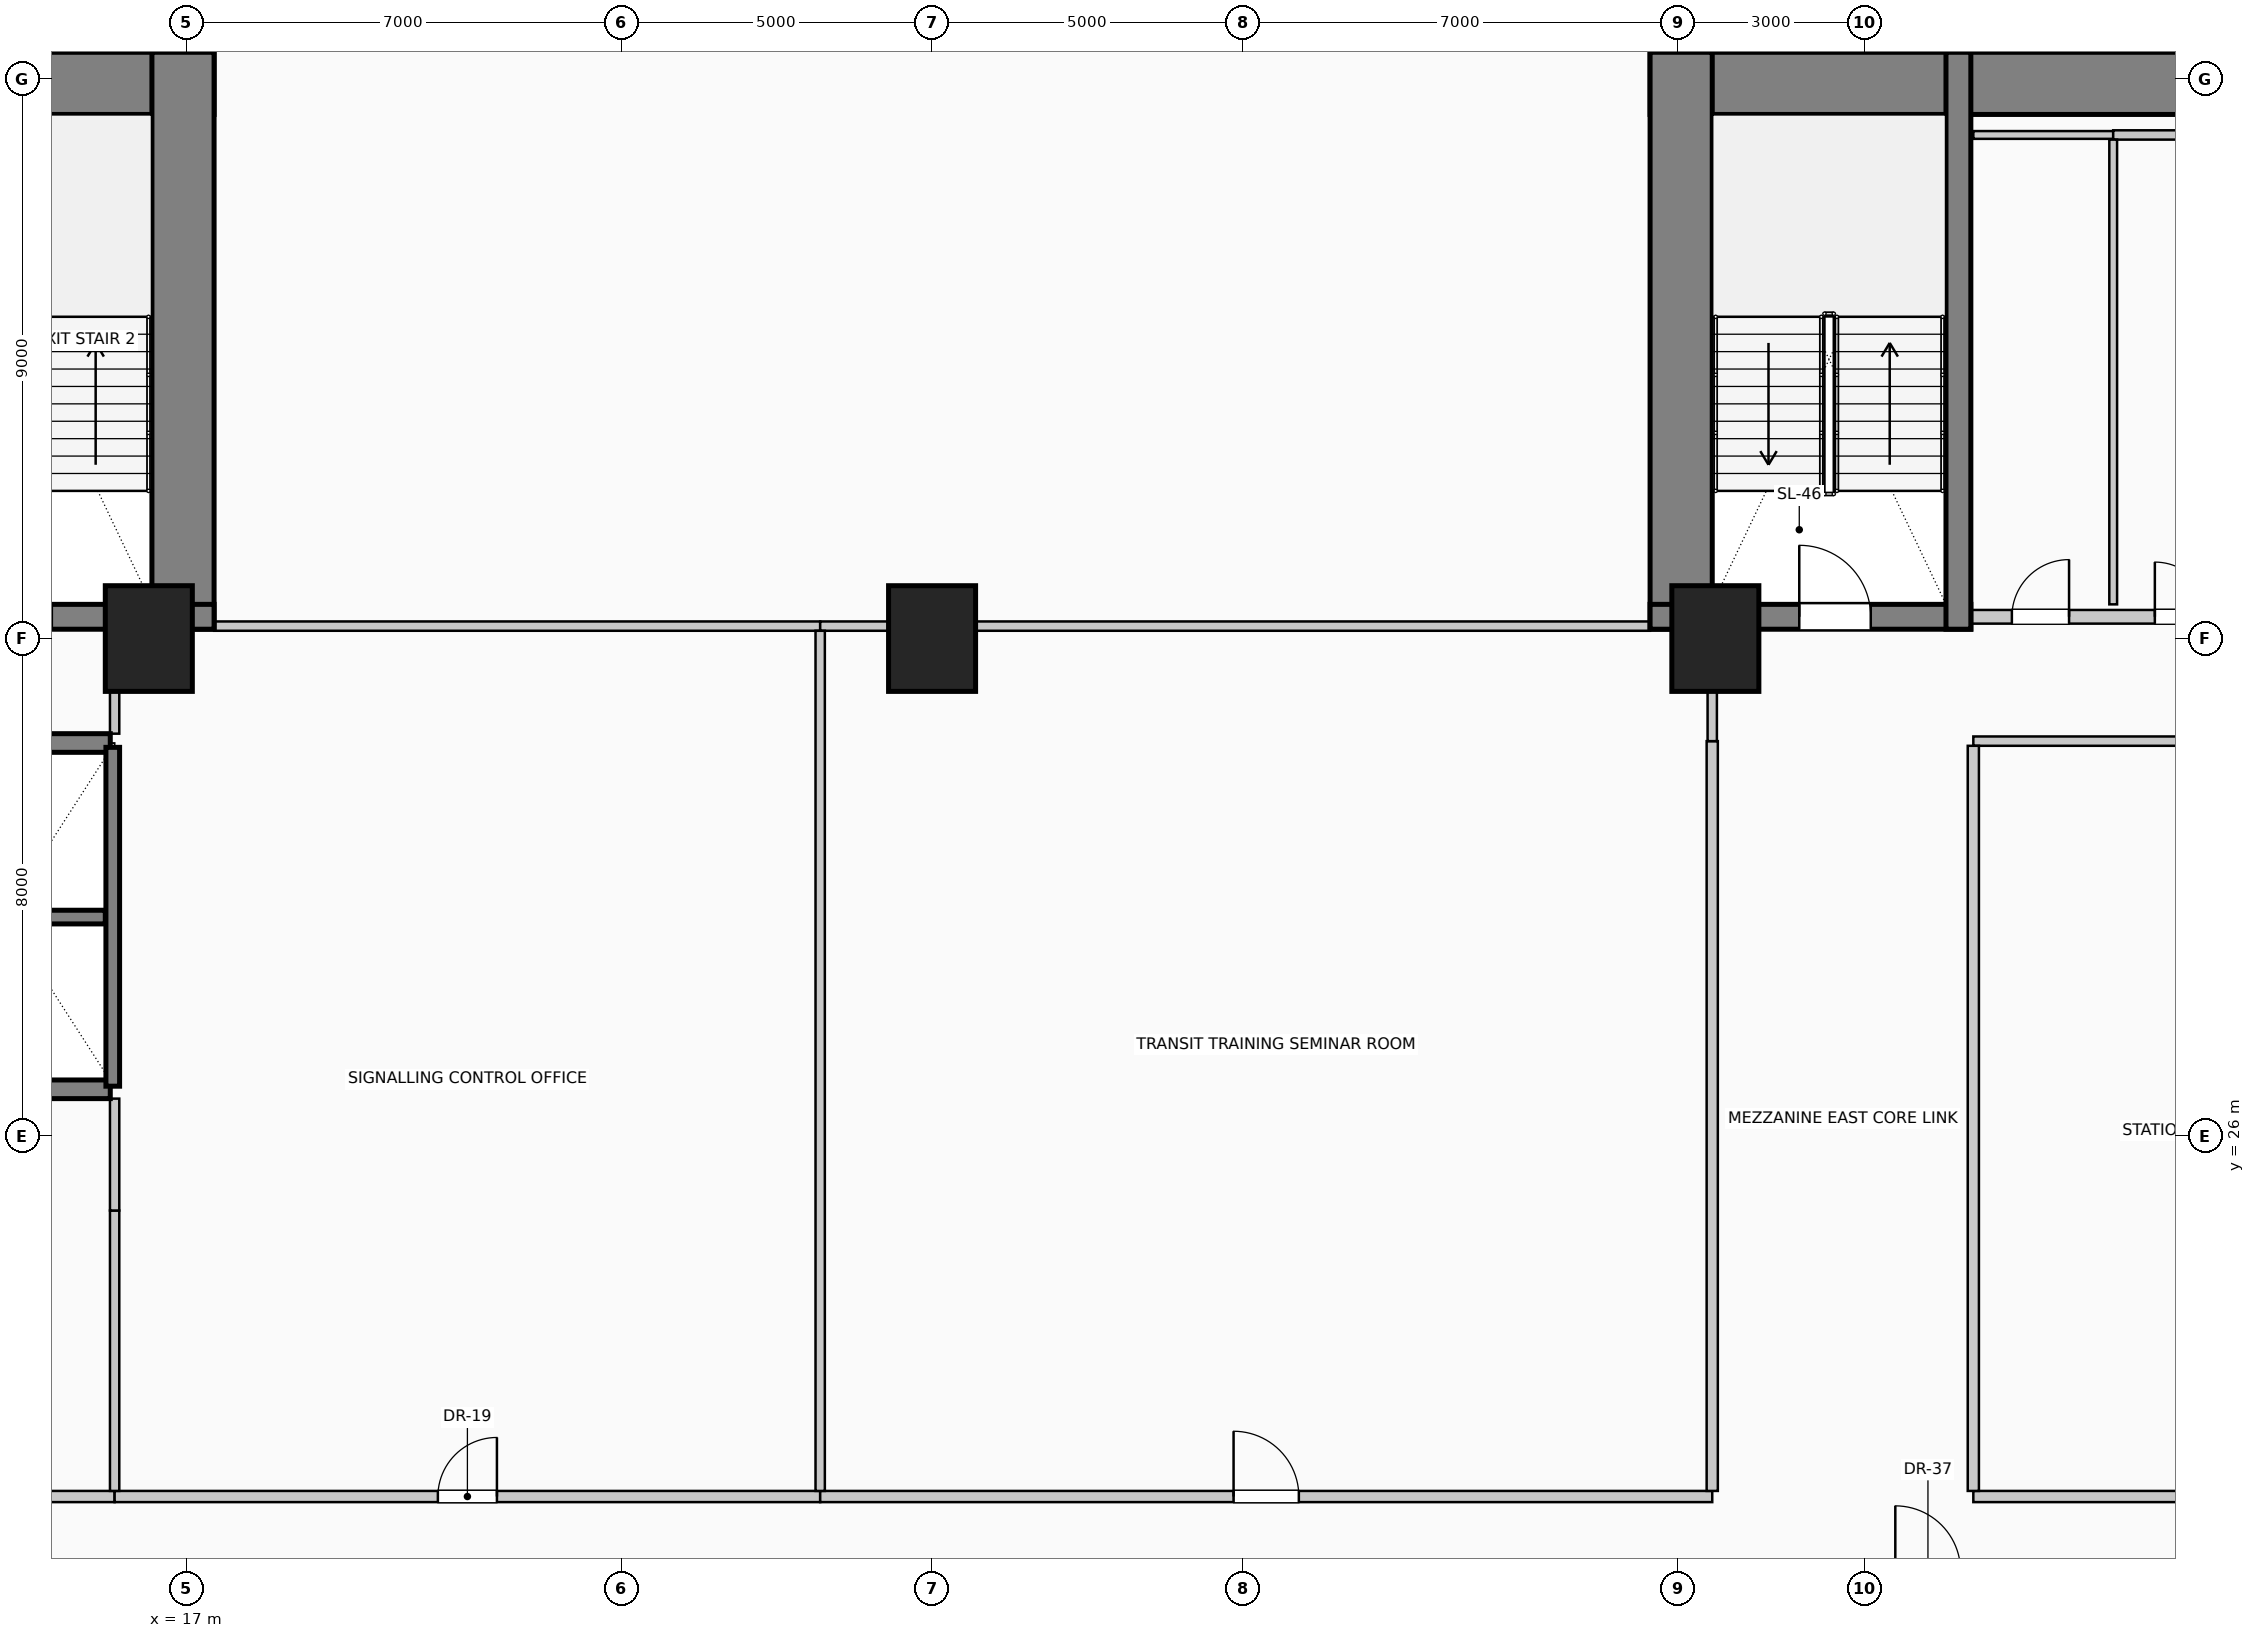
"""IFC4 building model, lengths in metres.
Left out: names, types, materials, properties, quantities, classifications, styles, units other than length and angle.
Written with IfcOpenShell. Run it as: python <this file> out.ifc"""

import sys

from ifc_helpers import new_model, si_unit, direction, frame, frame_2d, origin, origin_2d, place, context, subcontext, project, spatial, rectangle, extrude, element, fill, save


model = new_model("IFC4")
c1 = context("Model", 3, precision=1e-05, world=origin(), true_north=direction((0.0, 1.0)))
c2 = subcontext(c1, "Body", "Model", "MODEL_VIEW")
j1 = project(units=[si_unit("LENGTHUNIT", "METRE"), si_unit("PLANEANGLEUNIT", "RADIAN")], contexts=[c1])
p1 = place(None, origin())
s1 = spatial("IfcSite", under=j1, at=p1, CompositionType="ELEMENT")
p2 = place(p1, origin())
s2 = spatial("IfcBuilding", under=s1, at=p2, CompositionType="ELEMENT")
p3 = place(p2, frame((0.0, 0.0, 13.5)))
s3 = spatial("IfcBuildingStorey", under=s2, at=p3, CompositionType="ELEMENT", Elevation=13.5)
p4 = place(p3, frame((2.55, 42.93, 0.0), z_axis=(0.0, 0.0, 1.0), x_axis=(1.0, 0.0, 0.0)))
e1 = element("IfcWall", 1, at=p4, inside=s3, PredefinedType="SHEAR", context=c2, shape_type="SweptSolid", body=[
    extrude(rectangle(XDim=14.9, YDim=1.0, at=frame_2d((7.45, 0.0))), origin(), (0.0, 0.0, 1.0), 4.05),
])
p5 = place(p3, frame((16.95, 34.15, 0.0), z_axis=(0.0, 0.0, 1.0), x_axis=(0.0, 1.0, 0.0)))
e2 = element("IfcWall", 2, at=p5, inside=s3, PredefinedType="SHEAR", context=c2, shape_type="SweptSolid", body=[
    extrude(rectangle(XDim=9.28, YDim=1.0, at=frame_2d((4.64, 0.0))), origin(), (0.0, 0.0, 1.0), 4.05),
])
p6 = place(p3, frame((12.29, 34.35, 0.0), z_axis=(0.0, 0.0, 1.0), x_axis=(1.0, 0.0, 0.0)))
e3 = element("IfcWall", 3, at=p6, inside=s3, PredefinedType="SHEAR", context=c2, shape_type="SweptSolid", body=[
    extrude(rectangle(XDim=5.16, YDim=0.4, at=frame_2d((2.58, 0.0))), origin(), (0.0, 0.0, 1.0), 4.05),
])
p7 = place(p6, frame((1.4, 0.0, 0.0)))
e4 = element("IfcOpeningElement", 4, at=p7, cuts=e3, PredefinedType="OPENING", context=c2, shape_type="SweptSolid", body=[
    extrude(rectangle(XDim=1.15, YDim=2.2, at=frame_2d((0.575, 1.1))), frame((0.0, 0.21, 0.0), z_axis=(0.0, -1.0, 0.0), x_axis=(1.0, 0.0, 0.0)), (0.0, 0.0, 1.0), 0.42),
])
p8 = place(p3, frame((40.55, 42.93, 0.0), z_axis=(0.0, 0.0, 1.0), x_axis=(1.0, 0.0, 0.0)))
e5 = element("IfcWall", 5, at=p8, inside=s3, PredefinedType="SHEAR", context=c2, shape_type="SweptSolid", body=[
    extrude(rectangle(XDim=14.9, YDim=1.0, at=frame_2d((7.45, 0.0))), origin(), (0.0, 0.0, 1.0), 4.05),
])
p9 = place(p3, frame((41.05, 34.15, 0.0), z_axis=(0.0, 0.0, 1.0), x_axis=(0.0, 1.0, 0.0)))
e6 = element("IfcWall", 6, at=p9, inside=s3, PredefinedType="SHEAR", context=c2, shape_type="SweptSolid", body=[
    extrude(rectangle(XDim=9.28, YDim=1.0, at=frame_2d((4.64, 0.0))), origin(), (0.0, 0.0, 1.0), 4.05),
])
p10 = place(p3, frame((40.55, 34.35, 0.0), z_axis=(0.0, 0.0, 1.0), x_axis=(1.0, 0.0, 0.0)))
e7 = element("IfcWall", 7, at=p10, inside=s3, PredefinedType="SHEAR", context=c2, shape_type="SweptSolid", body=[
    extrude(rectangle(XDim=5.16, YDim=0.4, at=frame_2d((2.58, 0.0))), origin(), (0.0, 0.0, 1.0), 4.05),
])
p11 = place(p10, frame((2.4, 0.0, 0.0)))
e8 = element("IfcOpeningElement", 8, at=p11, cuts=e7, PredefinedType="OPENING", context=c2, shape_type="SweptSolid", body=[
    extrude(rectangle(XDim=1.15, YDim=2.2, at=frame_2d((0.575, 1.1))), frame((0.0, 0.21, 0.0), z_axis=(0.0, -1.0, 0.0), x_axis=(1.0, 0.0, 0.0)), (0.0, 0.0, 1.0), 0.42),
])
p12 = place(p3, frame((45.51, 34.15, 0.0), z_axis=(0.0, 0.0, 1.0), x_axis=(0.0, 1.0, 0.0)))
e9 = element("IfcWall", 9, at=p12, inside=s3, PredefinedType="SHEAR", context=c2, shape_type="SweptSolid", body=[
    extrude(rectangle(XDim=9.28, YDim=0.4, at=frame_2d((4.64, 0.0))), origin(), (0.0, 0.0, 1.0), 4.05),
])
for number, where, z_axis, x_axis in (
    (10, (16.4, 34.0, 0.0), (0.0, 0.0, 1.0), (1.0, 0.0, 0.0)),
    (11, (29.0, 34.0, 0.0), (0.0, 0.0, 1.0), (1.0, 0.0, 0.0)),
    (12, (41.6, 34.0, 0.0), (0.0, 0.0, 1.0), (1.0, 0.0, 0.0)),
):
    element("IfcColumn", number, at=place(p3, frame(where, z_axis=z_axis, x_axis=x_axis)), inside=s3, PredefinedType="COLUMN", context=c2, shape_type="SweptSolid", body=[
        extrude(rectangle(XDim=1.4, YDim=1.7, at=origin_2d()), origin(), (0.0, 0.0, 1.0), 4.05),
    ])
for number, where, z_axis, x_axis in (
    (13, (15.78, 26.75, 0.0), (0.0, 0.0, 1.0), (-1.0, 0.0, 0.0)),
    (14, (14.0, 32.32, 0.0), (0.0, 0.0, 1.0), (1.0, 0.0, 0.0)),
):
    element("IfcWall", number, at=place(p3, frame(where, z_axis=z_axis, x_axis=x_axis)), inside=s3, PredefinedType="SOLIDWALL", context=c2, shape_type="SweptSolid", body=[
        extrude(rectangle(XDim=1.78, YDim=0.3, at=frame_2d((0.89, 0.0))), origin(), (0.0, 0.0, 1.0), 4.05),
    ])
p13 = place(p3, frame((15.82, 26.8, 0.0), z_axis=(0.0, 0.0, 1.0), x_axis=(0.0, 1.0, 0.0)))
e15 = element("IfcWall", 15, at=p13, inside=s3, PredefinedType="SOLIDWALL", context=c2, shape_type="SweptSolid", body=[
    extrude(rectangle(XDim=5.45, YDim=0.22, at=frame_2d((2.725, 0.0))), origin(), (0.0, 0.0, 1.0), 4.05),
])
p14 = place(p3, frame((12.3, 29.52, 0.0), z_axis=(0.0, 0.0, 1.0), x_axis=(1.0, 0.0, 0.0)))
e16 = element("IfcWall", 16, at=p14, inside=s3, PredefinedType="SOLIDWALL", context=c2, shape_type="SweptSolid", body=[
    extrude(rectangle(XDim=3.4, YDim=0.22, at=frame_2d((1.7, 0.0))), origin(), (0.0, 0.0, 1.0), 4.05),
])
p15 = place(p3, frame((45.72, 34.35, 0.0), z_axis=(0.0, 0.0, 1.0), x_axis=(1.0, 0.0, 0.0)))
e17 = element("IfcWall", 17, at=p15, inside=s3, PredefinedType="PARTITIONING", context=c2, shape_type="SweptSolid", body=[
    extrude(rectangle(XDim=4.56, YDim=0.22, at=frame_2d((2.28, 0.0))), origin(), (0.0, 0.0, 1.0), 2.695),
])
p16 = place(p15, frame((0.65, 0.0, 0.0)))
e18 = element("IfcOpeningElement", 18, at=p16, cuts=e17, PredefinedType="OPENING", context=c2, shape_type="SweptSolid", body=[
    extrude(rectangle(XDim=0.92, YDim=2.1, at=frame_2d((0.46, 1.05))), frame((0.0, 0.12, 0.0), z_axis=(0.0, -1.0, 0.0), x_axis=(1.0, 0.0, 0.0)), (0.0, 0.0, 1.0), 0.24),
])
p17 = place(p15, frame((2.95, 0.0, 0.0)))
e19 = element("IfcOpeningElement", 19, at=p17, cuts=e17, PredefinedType="OPENING", context=c2, shape_type="SweptSolid", body=[
    extrude(rectangle(XDim=0.88, YDim=2.1, at=frame_2d((0.44, 1.05))), frame((0.0, 0.12, 0.0), z_axis=(0.0, -1.0, 0.0), x_axis=(1.0, 0.0, 0.0)), (0.0, 0.0, 1.0), 0.24),
])
p18 = place(p3, frame((12.2, 20.2, 0.0), z_axis=(0.0, 0.0, 1.0), x_axis=(1.0, 0.0, 0.0)))
e20 = element("IfcWall", 20, at=p18, inside=s3, PredefinedType="PARTITIONING", context=c2, shape_type="SweptSolid", body=[
    extrude(rectangle(XDim=3.65, YDim=0.18, at=frame_2d((1.825, 0.0))), origin(), (0.0, 0.0, 1.0), 3.65),
])
p19 = place(p3, frame((15.85, 20.2, 0.0), z_axis=(0.0, 0.0, 1.0), x_axis=(1.0, 0.0, 0.0)))
e21 = element("IfcWall", 21, at=p19, inside=s3, PredefinedType="PARTITIONING", context=c2, shape_type="SweptSolid", body=[
    extrude(rectangle(XDim=11.35, YDim=0.18, at=frame_2d((5.675, 0.0))), origin(), (0.0, 0.0, 1.0), 3.65),
])
p20 = place(p19, frame((5.2, 0.0, 0.0)))
e22 = element("IfcOpeningElement", 22, at=p20, cuts=e21, PredefinedType="OPENING", context=c2, shape_type="SweptSolid", body=[
    extrude(rectangle(XDim=0.95, YDim=2.15, at=frame_2d((0.475, 1.075))), frame((0.0, 0.1, 0.0), z_axis=(0.0, -1.0, 0.0), x_axis=(1.0, 0.0, 0.0)), (0.0, 0.0, 1.0), 0.2),
])
p21 = place(p3, frame((27.2, 20.2, 0.0), z_axis=(0.0, 0.0, 1.0), x_axis=(1.0, 0.0, 0.0)))
e23 = element("IfcWall", 23, at=p21, inside=s3, PredefinedType="PARTITIONING", context=c2, shape_type="SweptSolid", body=[
    extrude(rectangle(XDim=14.35, YDim=0.18, at=frame_2d((7.175, 0.0))), origin(), (0.0, 0.0, 1.0), 3.65),
])
p22 = place(p21, frame((6.65, 0.0, 0.0)))
e24 = element("IfcOpeningElement", 24, at=p22, cuts=e23, PredefinedType="OPENING", context=c2, shape_type="SweptSolid", body=[
    extrude(rectangle(XDim=1.05, YDim=2.15, at=frame_2d((0.525, 1.075))), frame((0.0, 0.1, 0.0), z_axis=(0.0, -1.0, 0.0), x_axis=(1.0, 0.0, 0.0)), (0.0, 0.0, 1.0), 0.2),
])
p23 = place(p3, frame((45.75, 20.2, 0.0), z_axis=(0.0, 0.0, 1.0), x_axis=(1.0, 0.0, 0.0)))
e25 = element("IfcWall", 25, at=p23, inside=s3, PredefinedType="PARTITIONING", context=c2, shape_type="SweptSolid", body=[
    extrude(rectangle(XDim=8.05, YDim=0.18, at=frame_2d((4.025, 0.0))), origin(), (0.0, 0.0, 1.0), 3.65),
])
p24 = place(p3, frame((45.75, 32.35, 0.0), z_axis=(0.0, 0.0, 1.0), x_axis=(1.0, 0.0, 0.0)))
e26 = element("IfcWall", 26, at=p24, inside=s3, PredefinedType="PARTITIONING", context=c2, shape_type="SweptSolid", body=[
    extrude(rectangle(XDim=8.7, YDim=0.15, at=frame_2d((4.35, 0.0))), origin(), (0.0, 0.0, 1.0), 3.65),
])
p25 = place(p24, frame((3.91, 0.0, 0.0)))
e27 = element("IfcOpeningElement", 27, at=p25, cuts=e26, PredefinedType="OPENING", context=c2, shape_type="SweptSolid", body=[
    extrude(rectangle(XDim=0.88, YDim=2.1, at=frame_2d((0.44, 1.05))), frame((0.0, 0.085, 0.0), z_axis=(0.0, -1.0, 0.0), x_axis=(1.0, 0.0, 0.0)), (0.0, 0.0, 1.0), 0.17),
])
p26 = place(p3, frame((17.45, 34.2, 0.0), z_axis=(0.0, 0.0, 1.0), x_axis=(1.0, 0.0, 0.0)))
e28 = element("IfcWall", 28, at=p26, inside=s3, PredefinedType="PARTITIONING", context=c2, shape_type="SweptSolid", body=[
    extrude(rectangle(XDim=9.75, YDim=0.15, at=frame_2d((4.875, 0.0))), origin(), (0.0, 0.0, 1.0), 2.695),
])
p27 = place(p3, frame((27.2, 34.2, 0.0), z_axis=(0.0, 0.0, 1.0), x_axis=(1.0, 0.0, 0.0)))
e29 = element("IfcWall", 29, at=p27, inside=s3, PredefinedType="PARTITIONING", context=c2, shape_type="SweptSolid", body=[
    extrude(rectangle(XDim=1.1, YDim=0.15, at=frame_2d((0.55, 0.0))), origin(), (0.0, 0.0, 1.0), 2.695),
])
p28 = place(p3, frame((29.7, 34.2, 0.0), z_axis=(0.0, 0.0, 1.0), x_axis=(1.0, 0.0, 0.0)))
e30 = element("IfcWall", 30, at=p28, inside=s3, PredefinedType="PARTITIONING", context=c2, shape_type="SweptSolid", body=[
    extrude(rectangle(XDim=10.85, YDim=0.15, at=frame_2d((5.425, 0.0))), origin(), (0.0, 0.0, 1.0), 2.695),
])
p29 = place(p3, frame((45.75, 42.1, 0.0), z_axis=(0.0, 0.0, 1.0), x_axis=(1.0, 0.0, 0.0)))
e31 = element("IfcWall", 31, at=p29, inside=s3, PredefinedType="PARTITIONING", context=c2, shape_type="SweptSolid", body=[
    extrude(rectangle(XDim=2.25, YDim=0.125, at=frame_2d((1.125, 0.0))), origin(), (0.0, 0.0, 1.0), 3.65),
])
p30 = place(p3, frame((48.0, 42.1, 0.0), z_axis=(0.0, 0.0, 1.0), x_axis=(1.0, 0.0, 0.0)))
e32 = element("IfcWall", 32, at=p30, inside=s3, PredefinedType="PARTITIONING", context=c2, shape_type="SweptSolid", body=[
    extrude(rectangle(XDim=2.25, YDim=0.15, at=frame_2d((1.125, 0.0))), origin(), (0.0, 0.0, 1.0), 3.65),
])
p31 = place(p3, frame((15.85, 20.29, 0.0), z_axis=(0.0, 0.0, 1.0), x_axis=(0.0, 1.0, 0.0)))
e33 = element("IfcWall", 33, at=p31, inside=s3, PredefinedType="PARTITIONING", context=c2, shape_type="SweptSolid", body=[
    extrude(rectangle(XDim=4.51, YDim=0.15, at=frame_2d((2.255, 0.0))), origin(), (0.0, 0.0, 1.0), 3.65),
])
p32 = place(p3, frame((15.85, 24.8, 0.0), z_axis=(0.0, 0.0, 1.0), x_axis=(0.0, 1.0, 0.0)))
e34 = element("IfcWall", 34, at=p32, inside=s3, PredefinedType="PARTITIONING", context=c2, shape_type="SweptSolid", body=[
    extrude(rectangle(XDim=1.8, YDim=0.15, at=frame_2d((0.9, 0.0))), origin(), (0.0, 0.0, 1.0), 3.65),
])
p33 = place(p3, frame((15.85, 32.47, 0.0), z_axis=(0.0, 0.0, 1.0), x_axis=(0.0, 1.0, 0.0)))
e35 = element("IfcWall", 35, at=p33, inside=s3, PredefinedType="PARTITIONING", context=c2, shape_type="SweptSolid", body=[
    extrude(rectangle(XDim=0.68, YDim=0.15, at=frame_2d((0.34, 0.0))), origin(), (0.0, 0.0, 1.0), 3.65),
])
p34 = place(p3, frame((27.2, 20.29, 0.0), z_axis=(0.0, 0.0, 1.0), x_axis=(0.0, 1.0, 0.0)))
e36 = element("IfcWall", 36, at=p34, inside=s3, PredefinedType="PARTITIONING", context=c2, shape_type="SweptSolid", body=[
    extrude(rectangle(XDim=13.835, YDim=0.15, at=frame_2d((6.917, 0.0))), origin(), (0.0, 0.0, 1.0), 3.65),
])
p35 = place(p3, frame((41.55, 20.29, 0.0), z_axis=(0.0, 0.0, 1.0), x_axis=(0.0, 1.0, 0.0)))
e37 = element("IfcWall", 37, at=p35, inside=s3, PredefinedType="PARTITIONING", context=c2, shape_type="SweptSolid", body=[
    extrude(rectangle(XDim=12.06, YDim=0.18, at=frame_2d((6.03, 0.0))), origin(), (0.0, 0.0, 1.0), 2.695),
])
p36 = place(p3, frame((41.55, 32.35, 0.0), z_axis=(0.0, 0.0, 1.0), x_axis=(0.0, 1.0, 0.0)))
e38 = element("IfcWall", 38, at=p36, inside=s3, PredefinedType="PARTITIONING", context=c2, shape_type="SweptSolid", body=[
    extrude(rectangle(XDim=0.8, YDim=0.15, at=frame_2d((0.4, 0.0))), origin(), (0.0, 0.0, 1.0), 2.695),
])
p37 = place(p3, frame((45.75, 20.29, 0.0), z_axis=(0.0, 0.0, 1.0), x_axis=(0.0, 1.0, 0.0)))
e39 = element("IfcWall", 39, at=p37, inside=s3, PredefinedType="PARTITIONING", context=c2, shape_type="SweptSolid", body=[
    extrude(rectangle(XDim=11.985, YDim=0.18, at=frame_2d((5.992, 0.0))), origin(), (0.0, 0.0, 1.0), 3.65),
])
p38 = place(p3, frame((48.0, 34.55, 0.0), z_axis=(0.0, 0.0, 1.0), x_axis=(0.0, 1.0, 0.0)))
e40 = element("IfcWall", 40, at=p38, inside=s3, PredefinedType="PARTITIONING", context=c2, shape_type="SweptSolid", body=[
    extrude(rectangle(XDim=7.475, YDim=0.125, at=frame_2d((3.737, 0.0))), origin(), (0.0, 0.0, 1.0), 3.65),
])
p39 = place(p11, origin())
e41 = element("IfcDoor", 41, at=p39, inside=s3, OperationType="SINGLE_SWING_LEFT", PredefinedType="DOOR", context=c2, shape_type="SweptSolid", body=[
    extrude(rectangle(XDim=1.15, YDim=2.2, at=frame_2d((0.575, 1.1))), frame((0.0, 0.025, 0.0), z_axis=(0.0, -1.0, 0.0), x_axis=(1.0, 0.0, 0.0)), (0.0, 0.0, 1.0), 0.05),
])
fill(e8, e41)
p40 = place(p16, origin())
e42 = element("IfcDoor", 42, at=p40, inside=s3, OperationType="SINGLE_SWING_RIGHT", PredefinedType="DOOR", context=c2, shape_type="SweptSolid", body=[
    extrude(rectangle(XDim=0.92, YDim=2.1, at=frame_2d((0.46, 1.05))), frame((0.0, 0.025, 0.0), z_axis=(0.0, -1.0, 0.0), x_axis=(1.0, 0.0, 0.0)), (0.0, 0.0, 1.0), 0.05),
])
fill(e18, e42)
p41 = place(p17, origin())
e43 = element("IfcDoor", 43, at=p41, inside=s3, OperationType="SINGLE_SWING_LEFT", PredefinedType="DOOR", context=c2, shape_type="SweptSolid", body=[
    extrude(rectangle(XDim=0.88, YDim=2.1, at=frame_2d((0.44, 1.05))), frame((0.0, 0.025, 0.0), z_axis=(0.0, -1.0, 0.0), x_axis=(1.0, 0.0, 0.0)), (0.0, 0.0, 1.0), 0.05),
])
fill(e19, e43)
p42 = place(p20, origin())
e44 = element("IfcDoor", 44, at=p42, inside=s3, OperationType="SINGLE_SWING_RIGHT", PredefinedType="DOOR", context=c2, shape_type="SweptSolid", body=[
    extrude(rectangle(XDim=0.95, YDim=2.15, at=frame_2d((0.475, 1.075))), frame((0.0, 0.025, 0.0), z_axis=(0.0, -1.0, 0.0), x_axis=(1.0, 0.0, 0.0)), (0.0, 0.0, 1.0), 0.05),
])
fill(e22, e44)
p43 = place(p22, origin())
e45 = element("IfcDoor", 45, at=p43, inside=s3, OperationType="SINGLE_SWING_LEFT", PredefinedType="DOOR", context=c2, shape_type="SweptSolid", body=[
    extrude(rectangle(XDim=1.05, YDim=2.15, at=frame_2d((0.525, 1.075))), frame((0.0, 0.025, 0.0), z_axis=(0.0, -1.0, 0.0), x_axis=(1.0, 0.0, 0.0)), (0.0, 0.0, 1.0), 0.05),
])
fill(e24, e45)
save(model, sys.argv[1])
